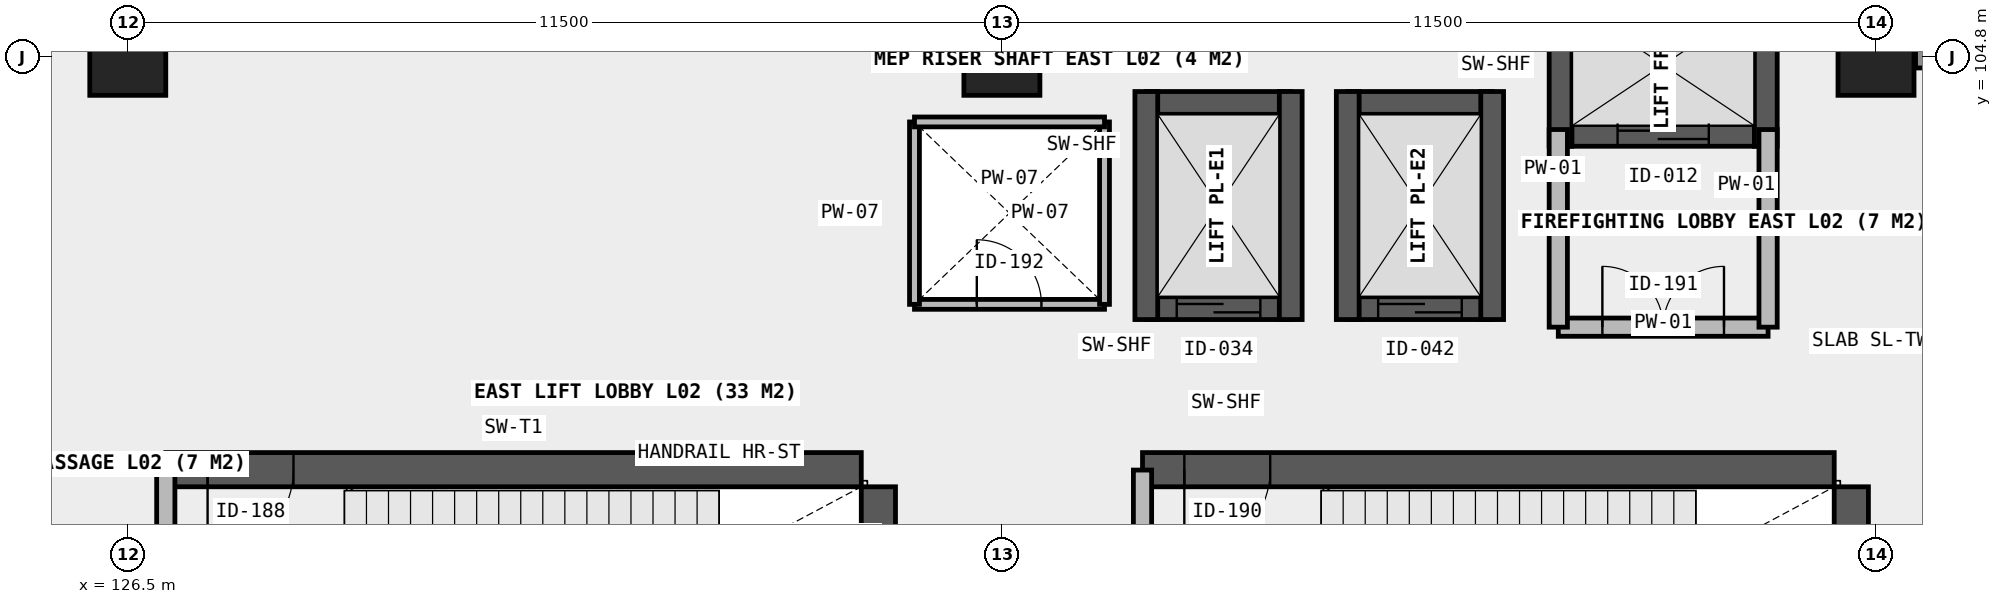
"""IFC4 building model, lengths in metres.
Left out: names, types, materials, properties, quantities, classifications, styles, units other than length and angle.
Written with IfcOpenShell. Run it as: python <this file> out.ifc"""

import sys

from ifc_helpers import new_model, si_unit, direction, frame, frame_2d, origin, origin_2d, place, context, subcontext, project, spatial, rectangle, extrude, element, fill, save


model = new_model("IFC4")
c1 = context("Model", 3, precision=1e-05, world=origin(), true_north=direction((0.0, 1.0)))
c2 = subcontext(c1, "Body", "Model", "MODEL_VIEW")
j1 = project(units=[si_unit("LENGTHUNIT", "METRE"), si_unit("PLANEANGLEUNIT", "RADIAN")], contexts=[c1])
p1 = place(None, origin())
s1 = spatial("IfcSite", under=j1, at=p1, CompositionType="ELEMENT")
p2 = place(p1, origin())
s2 = spatial("IfcBuilding", under=s1, at=p2, CompositionType="ELEMENT")
p3 = place(p2, frame((0.0, 0.0, 8.4)))
s3 = spatial("IfcBuildingStorey", under=s2, at=p3, CompositionType="ELEMENT", Elevation=8.4)
for number, where, z_axis, x_axis in (
    (1, (126.5, 104.8, 0.0), (0.0, 0.0, 1.0), (1.0, 0.0, 0.0)),
    (2, (138.0, 104.8, 0.0), (0.0, 0.0, 1.0), (1.0, 0.0, 0.0)),
    (3, (149.5, 104.8, 0.0), (0.0, 0.0, 1.0), (1.0, 0.0, 0.0)),
):
    element("IfcColumn", number, at=place(p3, frame(where, z_axis=z_axis, x_axis=x_axis)), inside=s3, PredefinedType="COLUMN", context=c2, shape_type="SweptSolid", body=[
        extrude(rectangle(XDim=1.0, YDim=1.0, at=origin_2d()), origin(), (0.0, 0.0, 1.0), 5.4),
    ])
p4 = place(p3, frame((145.35, 103.78, 0.0), z_axis=(0.0, 0.0, 1.0), x_axis=(1.0, 0.0, 0.0)))
e4 = element("IfcWall", 4, at=p4, inside=s3, PredefinedType="SHEAR", context=c2, shape_type="SweptSolid", body=[
    extrude(rectangle(XDim=2.7, YDim=0.3, at=frame_2d((1.35, 0.0))), origin(), (0.0, 0.0, 1.0), 5.4),
])
p5 = place(p4, frame((0.75, 0.0, 0.0)))
e5 = element("IfcOpeningElement", 5, at=p5, cuts=e4, PredefinedType="OPENING", context=c2, shape_type="SweptSolid", body=[
    extrude(rectangle(XDim=1.2, YDim=2.15, at=frame_2d((0.6, 1.075))), frame((0.0, 0.16, 0.0), z_axis=(0.0, -1.0, 0.0), x_axis=(1.0, 0.0, 0.0)), (0.0, 0.0, 1.0), 0.32),
])
for number, where, z_axis, x_axis in (
    (6, (145.35, 103.63, 0.0), (0.0, 0.0, 1.0), (0.0, 1.0, 0.0)),
    (7, (148.05, 103.63, 0.0), (0.0, 0.0, 1.0), (0.0, 1.0, 0.0)),
):
    element("IfcWall", number, at=place(p3, frame(where, z_axis=z_axis, x_axis=x_axis)), inside=s3, PredefinedType="SHEAR", context=c2, shape_type="SweptSolid", body=[
        extrude(rectangle(XDim=2.14, YDim=0.3, at=frame_2d((1.07, 0.0))), origin(), (0.0, 0.0, 1.0), 5.4),
    ])
p6 = place(p3, frame((139.9, 101.5, 0.0), z_axis=(0.0, 0.0, 1.0), x_axis=(1.0, 0.0, 0.0)))
e8 = element("IfcWall", 8, at=p6, inside=s3, PredefinedType="SHEAR", context=c2, shape_type="SweptSolid", body=[
    extrude(rectangle(XDim=1.9, YDim=0.3, at=frame_2d((0.95, 0.0))), origin(), (0.0, 0.0, 1.0), 5.4),
])
p7 = place(p6, frame((0.4, 0.0, 0.0)))
e9 = element("IfcOpeningElement", 9, at=p7, cuts=e8, PredefinedType="OPENING", context=c2, shape_type="SweptSolid", body=[
    extrude(rectangle(XDim=1.1, YDim=2.15, at=frame_2d((0.55, 1.075))), frame((0.0, 0.16, 0.0), z_axis=(0.0, -1.0, 0.0), x_axis=(1.0, 0.0, 0.0)), (0.0, 0.0, 1.0), 0.32),
])
p8 = place(p3, frame((139.9, 104.2, 0.0), z_axis=(0.0, 0.0, 1.0), x_axis=(1.0, 0.0, 0.0)))
e10 = element("IfcWall", 10, at=p8, inside=s3, PredefinedType="SHEAR", context=c2, shape_type="SweptSolid", body=[
    extrude(rectangle(XDim=1.9, YDim=0.3, at=frame_2d((0.95, 0.0))), origin(), (0.0, 0.0, 1.0), 5.4),
])
for number, where, z_axis, x_axis in (
    (11, (139.9, 101.35, 0.0), (0.0, 0.0, 1.0), (0.0, 1.0, 0.0)),
    (12, (141.8, 101.35, 0.0), (0.0, 0.0, 1.0), (0.0, 1.0, 0.0)),
):
    element("IfcWall", number, at=place(p3, frame(where, z_axis=z_axis, x_axis=x_axis)), inside=s3, PredefinedType="SHEAR", context=c2, shape_type="SweptSolid", body=[
        extrude(rectangle(XDim=3.0, YDim=0.3, at=frame_2d((1.5, 0.0))), origin(), (0.0, 0.0, 1.0), 5.4),
    ])
p9 = place(p3, frame((142.55, 101.5, 0.0), z_axis=(0.0, 0.0, 1.0), x_axis=(1.0, 0.0, 0.0)))
e13 = element("IfcWall", 13, at=p9, inside=s3, PredefinedType="SHEAR", context=c2, shape_type="SweptSolid", body=[
    extrude(rectangle(XDim=1.9, YDim=0.3, at=frame_2d((0.95, 0.0))), origin(), (0.0, 0.0, 1.0), 5.4),
])
p10 = place(p9, frame((0.4, 0.0, 0.0)))
e14 = element("IfcOpeningElement", 14, at=p10, cuts=e13, PredefinedType="OPENING", context=c2, shape_type="SweptSolid", body=[
    extrude(rectangle(XDim=1.1, YDim=2.15, at=frame_2d((0.55, 1.075))), frame((0.0, 0.16, 0.0), z_axis=(0.0, -1.0, 0.0), x_axis=(1.0, 0.0, 0.0)), (0.0, 0.0, 1.0), 0.32),
])
p11 = place(p3, frame((142.55, 104.2, 0.0), z_axis=(0.0, 0.0, 1.0), x_axis=(1.0, 0.0, 0.0)))
e15 = element("IfcWall", 15, at=p11, inside=s3, PredefinedType="SHEAR", context=c2, shape_type="SweptSolid", body=[
    extrude(rectangle(XDim=1.9, YDim=0.3, at=frame_2d((0.95, 0.0))), origin(), (0.0, 0.0, 1.0), 5.4),
])
for number, where, z_axis, x_axis in (
    (16, (142.55, 101.35, 0.0), (0.0, 0.0, 1.0), (0.0, 1.0, 0.0)),
    (17, (144.45, 101.35, 0.0), (0.0, 0.0, 1.0), (0.0, 1.0, 0.0)),
):
    element("IfcWall", number, at=place(p3, frame(where, z_axis=z_axis, x_axis=x_axis)), inside=s3, PredefinedType="SHEAR", context=c2, shape_type="SweptSolid", body=[
        extrude(rectangle(XDim=3.0, YDim=0.3, at=frame_2d((1.5, 0.0))), origin(), (0.0, 0.0, 1.0), 5.4),
    ])
p12 = place(p3, frame((127.0, 99.375, 0.0), z_axis=(0.0, 0.0, 1.0), x_axis=(1.0, 0.0, 0.0)))
e18 = element("IfcWall", 18, at=p12, inside=s3, PredefinedType="SHEAR", context=c2, shape_type="SweptSolid", body=[
    extrude(rectangle(XDim=9.15, YDim=0.45, at=frame_2d((4.575, 0.0))), origin(), (0.0, 0.0, 1.0), 5.4),
])
p13 = place(p12, frame((0.55, 0.0, 0.0)))
e19 = element("IfcOpeningElement", 19, at=p13, cuts=e18, PredefinedType="OPENING", context=c2, shape_type="SweptSolid", body=[
    extrude(rectangle(XDim=1.13, YDim=2.15, at=frame_2d((0.565, 1.075))), frame((0.0, 0.235, 0.0), z_axis=(0.0, -1.0, 0.0), x_axis=(1.0, 0.0, 0.0)), (0.0, 0.0, 1.0), 0.47),
])
p14 = place(p3, frame((136.375, 95.55, 0.0), z_axis=(0.0, 0.0, 1.0), x_axis=(0.0, 1.0, 0.0)))
e20 = element("IfcWall", 20, at=p14, inside=s3, PredefinedType="SHEAR", context=c2, shape_type="SweptSolid", body=[
    extrude(rectangle(XDim=3.6, YDim=0.45, at=frame_2d((1.8, 0.0))), origin(), (0.0, 0.0, 1.0), 5.4),
])
p15 = place(p3, frame((139.85, 99.375, 0.0), z_axis=(0.0, 0.0, 1.0), x_axis=(1.0, 0.0, 0.0)))
e21 = element("IfcWall", 21, at=p15, inside=s3, PredefinedType="SHEAR", context=c2, shape_type="SweptSolid", body=[
    extrude(rectangle(XDim=9.1, YDim=0.45, at=frame_2d((4.55, 0.0))), origin(), (0.0, 0.0, 1.0), 5.4),
])
p16 = place(p15, frame((0.55, 0.0, 0.0)))
e22 = element("IfcOpeningElement", 22, at=p16, cuts=e21, PredefinedType="OPENING", context=c2, shape_type="SweptSolid", body=[
    extrude(rectangle(XDim=1.13, YDim=2.15, at=frame_2d((0.565, 1.075))), frame((0.0, 0.235, 0.0), z_axis=(0.0, -1.0, 0.0), x_axis=(1.0, 0.0, 0.0)), (0.0, 0.0, 1.0), 0.47),
])
p17 = place(p3, frame((149.175, 95.32, 0.0), z_axis=(0.0, 0.0, 1.0), x_axis=(0.0, 1.0, 0.0)))
e23 = element("IfcWall", 23, at=p17, inside=s3, PredefinedType="SHEAR", context=c2, shape_type="SweptSolid", body=[
    extrude(rectangle(XDim=3.83, YDim=0.45, at=frame_2d((1.915, 0.0))), origin(), (0.0, 0.0, 1.0), 5.4),
])
p18 = place(p3, frame((150.02, 104.8, 0.0), z_axis=(0.0, 0.0, 1.0), x_axis=(1.0, 0.0, 0.0)))
e24 = element("IfcWall", 24, at=p18, inside=s3, PredefinedType="SOLIDWALL", context=c2, shape_type="SweptSolid", body=[
    extrude(rectangle(XDim=10.46, YDim=0.28, at=frame_2d((5.23, 0.0))), origin(), (0.0, 0.0, 1.0), 4.35),
])
p19 = place(p18, frame((1.92, 0.0, 0.85)))
e25 = element("IfcOpeningElement", 25, at=p19, cuts=e24, PredefinedType="OPENING", context=c2, shape_type="SweptSolid", body=[
    extrude(rectangle(XDim=2.35, YDim=2.05, at=frame_2d((1.175, 1.025))), frame((0.0, 0.15, 0.0), z_axis=(0.0, -1.0, 0.0), x_axis=(1.0, 0.0, 0.0)), (0.0, 0.0, 1.0), 0.3),
])
p20 = place(p18, frame((6.19, 0.0, 0.85)))
e26 = element("IfcOpeningElement", 26, at=p20, cuts=e24, PredefinedType="OPENING", context=c2, shape_type="SweptSolid", body=[
    extrude(rectangle(XDim=2.35, YDim=2.05, at=frame_2d((1.175, 1.025))), frame((0.0, 0.15, 0.0), z_axis=(0.0, -1.0, 0.0), x_axis=(1.0, 0.0, 0.0)), (0.0, 0.0, 1.0), 0.3),
])
p21 = place(p3, frame((127.0, 95.33, 0.0), z_axis=(0.0, 0.0, 1.0), x_axis=(0.0, 1.0, 0.0)))
e27 = element("IfcWall", 27, at=p21, inside=s3, PredefinedType="SOLIDWALL", context=c2, shape_type="SweptSolid", body=[
    extrude(rectangle(XDim=4.04, YDim=0.24, at=frame_2d((2.02, 0.0))), origin(), (0.0, 0.0, 1.0), 5.12),
])
p22 = place(p21, frame((1.45, 0.0, 0.0)))
e28 = element("IfcOpeningElement", 28, at=p22, cuts=e27, PredefinedType="OPENING", context=c2, shape_type="SweptSolid", body=[
    extrude(rectangle(XDim=1.13, YDim=2.15, at=frame_2d((0.565, 1.075))), frame((0.0, 0.13, 0.0), z_axis=(0.0, -1.0, 0.0), x_axis=(1.0, 0.0, 0.0)), (0.0, 0.0, 1.0), 0.26),
])
p23 = place(p3, frame((139.85, 95.33, 0.0), z_axis=(0.0, 0.0, 1.0), x_axis=(0.0, 1.0, 0.0)))
e29 = element("IfcWall", 29, at=p23, inside=s3, PredefinedType="SOLIDWALL", context=c2, shape_type="SweptSolid", body=[
    extrude(rectangle(XDim=4.04, YDim=0.24, at=frame_2d((2.02, 0.0))), origin(), (0.0, 0.0, 1.0), 5.12),
])
p24 = place(p23, frame((1.45, 0.0, 0.0)))
e30 = element("IfcOpeningElement", 30, at=p24, cuts=e29, PredefinedType="OPENING", context=c2, shape_type="SweptSolid", body=[
    extrude(rectangle(XDim=1.13, YDim=2.15, at=frame_2d((0.565, 1.075))), frame((0.0, 0.13, 0.0), z_axis=(0.0, -1.0, 0.0), x_axis=(1.0, 0.0, 0.0)), (0.0, 0.0, 1.0), 0.26),
])
p25 = place(p3, frame((145.32, 101.25, 0.0), z_axis=(0.0, 0.0, 1.0), x_axis=(1.0, 0.0, 0.0)))
e31 = element("IfcWall", 31, at=p25, inside=s3, PredefinedType="SOLIDWALL", context=c2, shape_type="SweptSolid", body=[
    extrude(rectangle(XDim=2.76, YDim=0.24, at=frame_2d((1.38, 0.0))), origin(), (0.0, 0.0, 1.0), 5.12),
])
p26 = place(p25, frame((0.58, 0.0, 0.0)))
e32 = element("IfcOpeningElement", 32, at=p26, cuts=e31, PredefinedType="OPENING", context=c2, shape_type="SweptSolid", body=[
    extrude(rectangle(XDim=1.6, YDim=2.15, at=frame_2d((0.8, 1.075))), frame((0.0, 0.13, 0.0), z_axis=(0.0, -1.0, 0.0), x_axis=(1.0, 0.0, 0.0)), (0.0, 0.0, 1.0), 0.26),
])
for number, where, z_axis, x_axis in (
    (33, (145.32, 101.25, 0.0), (0.0, 0.0, 1.0), (0.0, 1.0, 0.0)),
    (34, (148.08, 101.25, 0.0), (0.0, 0.0, 1.0), (0.0, 1.0, 0.0)),
):
    element("IfcWall", number, at=place(p3, frame(where, z_axis=z_axis, x_axis=x_axis)), inside=s3, PredefinedType="SOLIDWALL", context=c2, shape_type="SweptSolid", body=[
        extrude(rectangle(XDim=2.6, YDim=0.24, at=frame_2d((1.3, 0.0))), origin(), (0.0, 0.0, 1.0), 5.12),
    ])
p27 = place(p3, frame((136.85, 101.55, 0.0), z_axis=(0.0, 0.0, 1.0), x_axis=(1.0, 0.0, 0.0)))
e35 = element("IfcWall", 35, at=p27, inside=s3, PredefinedType="PLUMBINGWALL", context=c2, shape_type="SweptSolid", body=[
    extrude(rectangle(XDim=2.5, YDim=0.13, at=frame_2d((1.25, 0.0))), origin(), (0.0, 0.0, 1.0), 5.12),
])
p28 = place(p27, frame((0.82, 0.0, 0.0)))
e36 = element("IfcOpeningElement", 36, at=p28, cuts=e35, PredefinedType="OPENING", context=c2, shape_type="SweptSolid", body=[
    extrude(rectangle(XDim=0.85, YDim=2.0, at=frame_2d((0.425, 1.0))), frame((0.0, 0.075, 0.0), z_axis=(0.0, -1.0, 0.0), x_axis=(1.0, 0.0, 0.0)), (0.0, 0.0, 1.0), 0.15),
])
for number, where, z_axis, x_axis in (
    (37, (136.85, 101.55, 0.0), (0.0, 0.0, 1.0), (0.0, 1.0, 0.0)),
    (38, (139.35, 101.55, 0.0), (0.0, 0.0, 1.0), (0.0, 1.0, 0.0)),
):
    element("IfcWall", number, at=place(p3, frame(where, z_axis=z_axis, x_axis=x_axis)), inside=s3, PredefinedType="PLUMBINGWALL", context=c2, shape_type="SweptSolid", body=[
        extrude(rectangle(XDim=2.4, YDim=0.13, at=frame_2d((1.2, 0.0))), origin(), (0.0, 0.0, 1.0), 5.12),
    ])
p29 = place(p3, frame((136.85, 103.95, 0.0), z_axis=(0.0, 0.0, 1.0), x_axis=(1.0, 0.0, 0.0)))
e39 = element("IfcWall", 39, at=p29, inside=s3, PredefinedType="PLUMBINGWALL", context=c2, shape_type="SweptSolid", body=[
    extrude(rectangle(XDim=2.5, YDim=0.13, at=frame_2d((1.25, 0.0))), origin(), (0.0, 0.0, 1.0), 5.12),
])
p30 = place(p5, origin())
e40 = element("IfcDoor", 40, at=p30, inside=s3, OperationType="SLIDING_TO_RIGHT", PredefinedType="DOOR", context=c2, shape_type="SweptSolid", body=[
    extrude(rectangle(XDim=1.2, YDim=2.15, at=frame_2d((0.6, 1.075))), frame((0.0, 0.025, 0.0), z_axis=(0.0, -1.0, 0.0), x_axis=(1.0, 0.0, 0.0)), (0.0, 0.0, 1.0), 0.05),
])
fill(e5, e40)
p31 = place(p7, origin())
e41 = element("IfcDoor", 41, at=p31, inside=s3, OperationType="SLIDING_TO_LEFT", PredefinedType="DOOR", context=c2, shape_type="SweptSolid", body=[
    extrude(rectangle(XDim=1.1, YDim=2.15, at=frame_2d((0.55, 1.075))), frame((0.0, 0.025, 0.0), z_axis=(0.0, -1.0, 0.0), x_axis=(1.0, 0.0, 0.0)), (0.0, 0.0, 1.0), 0.05),
])
fill(e9, e41)
p32 = place(p10, origin())
e42 = element("IfcDoor", 42, at=p32, inside=s3, OperationType="SLIDING_TO_LEFT", PredefinedType="DOOR", context=c2, shape_type="SweptSolid", body=[
    extrude(rectangle(XDim=1.1, YDim=2.15, at=frame_2d((0.55, 1.075))), frame((0.0, 0.025, 0.0), z_axis=(0.0, -1.0, 0.0), x_axis=(1.0, 0.0, 0.0)), (0.0, 0.0, 1.0), 0.05),
])
fill(e14, e42)
p33 = place(p13, frame((0.565, 0.0, 0.0), z_axis=(0.0, 0.0, 1.0), x_axis=(-1.0, 0.0, 0.0)))
e43 = element("IfcDoor", 43, at=p33, inside=s3, OperationType="SINGLE_SWING_LEFT", PredefinedType="DOOR", context=c2, shape_type="SweptSolid", body=[
    extrude(rectangle(XDim=1.13, YDim=2.15, at=frame_2d((0.0, 1.075))), frame((0.0, 0.025, 0.0), z_axis=(0.0, -1.0, 0.0), x_axis=(1.0, 0.0, 0.0)), (0.0, 0.0, 1.0), 0.05),
])
fill(e19, e43)
p34 = place(p16, frame((0.565, 0.0, 0.0), z_axis=(0.0, 0.0, 1.0), x_axis=(-1.0, 0.0, 0.0)))
e44 = element("IfcDoor", 44, at=p34, inside=s3, OperationType="SINGLE_SWING_LEFT", PredefinedType="DOOR", context=c2, shape_type="SweptSolid", body=[
    extrude(rectangle(XDim=1.13, YDim=2.15, at=frame_2d((0.0, 1.075))), frame((0.0, 0.025, 0.0), z_axis=(0.0, -1.0, 0.0), x_axis=(1.0, 0.0, 0.0)), (0.0, 0.0, 1.0), 0.05),
])
fill(e22, e44)
p35 = place(p26, origin())
e45 = element("IfcDoor", 45, at=p35, inside=s3, OperationType="DOUBLE_DOOR_SINGLE_SWING", PredefinedType="DOOR", context=c2, shape_type="SweptSolid", body=[
    extrude(rectangle(XDim=1.6, YDim=2.15, at=frame_2d((0.8, 1.075))), frame((0.0, 0.025, 0.0), z_axis=(0.0, -1.0, 0.0), x_axis=(1.0, 0.0, 0.0)), (0.0, 0.0, 1.0), 0.05),
])
fill(e32, e45)
p36 = place(p28, origin())
e46 = element("IfcDoor", 46, at=p36, inside=s3, OperationType="SINGLE_SWING_LEFT", PredefinedType="TRAPDOOR", context=c2, shape_type="SweptSolid", body=[
    extrude(rectangle(XDim=0.85, YDim=2.0, at=frame_2d((0.425, 1.0))), frame((0.0, 0.025, 0.0), z_axis=(0.0, -1.0, 0.0), x_axis=(1.0, 0.0, 0.0)), (0.0, 0.0, 1.0), 0.05),
])
fill(e36, e46)
save(model, sys.argv[1])
